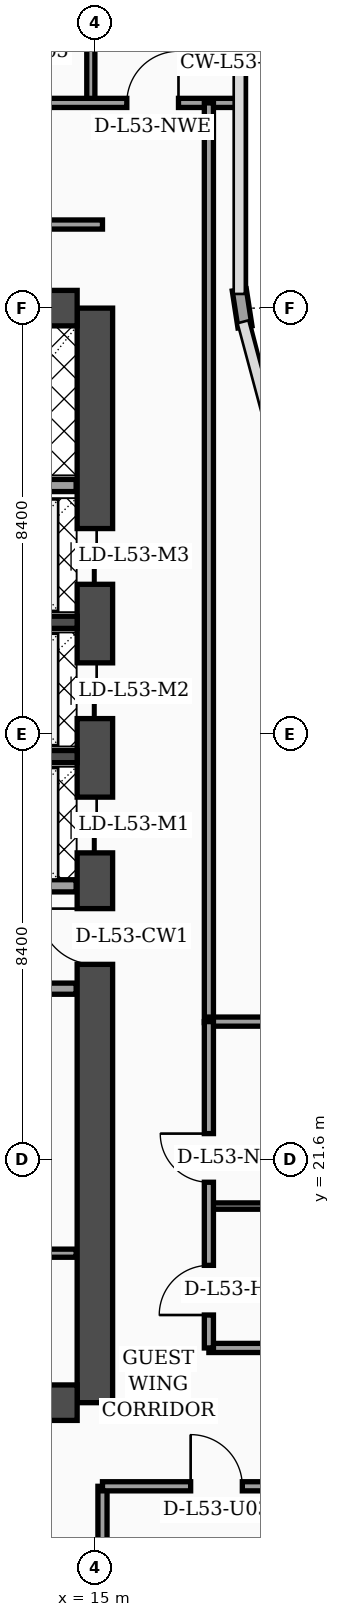
"""IFC4 building model, lengths in metres.
Left out: names, types, materials, properties, quantities, classifications, styles, units other than length and angle.
Written with IfcOpenShell. Run it as: python <this file> out.ifc"""

import sys

from ifc_helpers import new_model, si_unit, direction, frame, frame_2d, origin, place, context, subcontext, project, spatial, rectangle, extrude, element, fill, save


model = new_model("IFC4")
c1 = context("Model", 3, precision=1e-05, world=origin(), true_north=direction((0.0, 1.0)))
c2 = subcontext(c1, "Body", "Model", "MODEL_VIEW")
j1 = project(units=[si_unit("LENGTHUNIT", "METRE"), si_unit("PLANEANGLEUNIT", "RADIAN")], contexts=[c1])
p1 = place(None, origin())
s1 = spatial("IfcSite", under=j1, at=p1, CompositionType="ELEMENT")
p2 = place(p1, origin())
s2 = spatial("IfcBuilding", under=s1, at=p2, CompositionType="ELEMENT")
p3 = place(p2, frame((0.0, 0.0, 214.8)))
s3 = spatial("IfcBuildingStorey", under=s2, at=p3, CompositionType="ELEMENT", Elevation=214.8)
p4 = place(p3, frame((15.0, 16.8, 0.0), z_axis=(0.0, 0.0, 1.0), x_axis=(0.0, 1.0, 0.0)))
e1 = element("IfcWall", 1, at=p4, inside=s3, PredefinedType="SHEAR", context=c2, shape_type="SweptSolid", body=[
    extrude(rectangle(XDim=21.6, YDim=0.7, at=frame_2d((10.8, 0.0))), origin(), (0.0, 0.0, 1.0), 4.05),
])
p5 = place(p4, frame((8.65, 0.0, 0.0)))
e2 = element("IfcOpeningElement", 2, at=p5, cuts=e1, PredefinedType="OPENING", context=c2, shape_type="SweptSolid", body=[
    extrude(rectangle(XDim=1.1, YDim=2.2, at=frame_2d((0.55, 1.1))), frame((0.0, 0.36, 0.0), z_axis=(0.0, -1.0, 0.0), x_axis=(1.0, 0.0, 0.0)), (0.0, 0.0, 1.0), 0.72),
])
p6 = place(p4, frame((10.85, 0.0, 0.0)))
e3 = element("IfcOpeningElement", 3, at=p6, cuts=e1, PredefinedType="OPENING", context=c2, shape_type="SweptSolid", body=[
    extrude(rectangle(XDim=1.1, YDim=2.2, at=frame_2d((0.55, 1.1))), frame((0.0, 0.36, 0.0), z_axis=(0.0, -1.0, 0.0), x_axis=(1.0, 0.0, 0.0)), (0.0, 0.0, 1.0), 0.72),
])
p7 = place(p4, frame((13.5, 0.0, 0.0)))
e4 = element("IfcOpeningElement", 4, at=p7, cuts=e1, PredefinedType="OPENING", context=c2, shape_type="SweptSolid", body=[
    extrude(rectangle(XDim=1.1, YDim=2.2, at=frame_2d((0.55, 1.1))), frame((0.0, 0.36, 0.0), z_axis=(0.0, -1.0, 0.0), x_axis=(1.0, 0.0, 0.0)), (0.0, 0.0, 1.0), 0.72),
])
p8 = place(p4, frame((16.15, 0.0, 0.0)))
e5 = element("IfcOpeningElement", 5, at=p8, cuts=e1, PredefinedType="OPENING", context=c2, shape_type="SweptSolid", body=[
    extrude(rectangle(XDim=1.1, YDim=2.2, at=frame_2d((0.55, 1.1))), frame((0.0, 0.36, 0.0), z_axis=(0.0, -1.0, 0.0), x_axis=(1.0, 0.0, 0.0)), (0.0, 0.0, 1.0), 0.72),
])
for number, where, z_axis, x_axis in (
    (6, (4.55, 38.4, 0.0), (0.0, 0.0, 1.0), (1.0, 0.0, 0.0)),
    (7, (4.55, 16.8, 0.0), (0.0, 0.0, 1.0), (1.0, 0.0, 0.0)),
):
    element("IfcWall", number, at=place(p3, frame(where, z_axis=z_axis, x_axis=x_axis)), inside=s3, PredefinedType="SHEAR", context=c2, shape_type="SweptSolid", body=[
        extrude(rectangle(XDim=10.1, YDim=0.7, at=frame_2d((5.05, 0.0))), origin(), (0.0, 0.0, 1.0), 4.05),
    ])
for number, where, z_axis, x_axis in (
    (8, (12.18, 29.55, 0.0), (0.0, 0.0, 1.0), (1.0, 0.0, 0.0)),
    (9, (12.18, 32.2, 0.0), (0.0, 0.0, 1.0), (1.0, 0.0, 0.0)),
):
    element("IfcWall", number, at=place(p3, frame(where, z_axis=z_axis, x_axis=x_axis)), inside=s3, PredefinedType="SOLIDWALL", context=c2, shape_type="SweptSolid", body=[
        extrude(rectangle(XDim=2.47, YDim=0.24, at=frame_2d((1.235, 0.0))), origin(), (0.0, 0.0, 1.0), 4.05),
    ])
p9 = place(p3, frame((17.962, 38.03, 0.0), z_axis=(0.0, 0.0, 1.0), x_axis=(-0.15141125477, 0.988470855377, 0.0)))
e10 = element("IfcWall", 10, at=p9, inside=s3, PredefinedType="SOLIDWALL", context=c2, shape_type="SweptSolid", body=[
    extrude(rectangle(XDim=0.739, YDim=0.28, at=frame_2d((0.369, 0.0))), origin(), (0.0, 0.0, 1.0), 4.05),
])
p10 = place(p3, frame((9.68, 19.75, 0.0), z_axis=(0.0, 0.0, 1.0), x_axis=(1.0, 0.0, 0.0)))
e11 = element("IfcWall", 11, at=p10, inside=s3, PredefinedType="PARTITIONING", context=c2, shape_type="SweptSolid", body=[
    extrude(rectangle(XDim=4.95, YDim=0.16, at=frame_2d((2.475, 0.0))), origin(), (0.0, 0.0, 1.0), 4.05),
])
p11 = place(p10, frame((1.1, 0.0, 0.0)))
e12 = element("IfcOpeningElement", 12, at=p11, cuts=e11, PredefinedType="OPENING", context=c2, shape_type="SweptSolid", body=[
    extrude(rectangle(XDim=0.98, YDim=2.15, at=frame_2d((0.49, 1.075))), frame((0.0, 0.09, 0.0), z_axis=(0.0, -1.0, 0.0), x_axis=(1.0, 0.0, 0.0)), (0.0, 0.0, 1.0), 0.18),
])
p12 = place(p3, frame((9.68, 24.97, 0.0), z_axis=(0.0, 0.0, 1.0), x_axis=(1.0, 0.0, 0.0)))
e13 = element("IfcWall", 13, at=p12, inside=s3, PredefinedType="SOLIDWALL", context=c2, shape_type="SweptSolid", body=[
    extrude(rectangle(XDim=4.95, YDim=0.22, at=frame_2d((2.475, 0.0))), origin(), (0.0, 0.0, 1.0), 3.45),
])
p13 = place(p12, frame((0.9, 0.0, 0.0)))
e14 = element("IfcOpeningElement", 14, at=p13, cuts=e13, PredefinedType="OPENING", context=c2, shape_type="SweptSolid", body=[
    extrude(rectangle(XDim=0.98, YDim=2.15, at=frame_2d((0.49, 1.075))), frame((0.0, 0.12, 0.0), z_axis=(0.0, -1.0, 0.0), x_axis=(1.0, 0.0, 0.0)), (0.0, 0.0, 1.0), 0.24),
])
p14 = place(p3, frame((12.25, 27.0, 0.0), z_axis=(0.0, 0.0, 1.0), x_axis=(1.0, 0.0, 0.0)))
e15 = element("IfcWall", 15, at=p14, inside=s3, PredefinedType="SOLIDWALL", context=c2, shape_type="SweptSolid", body=[
    extrude(rectangle(XDim=2.38, YDim=0.24, at=frame_2d((1.19, 0.0))), origin(), (0.0, 0.0, 1.0), 4.05),
])
p15 = place(p3, frame((9.66, 34.9, 0.0), z_axis=(0.0, 0.0, 1.0), x_axis=(1.0, 0.0, 0.0)))
e16 = element("IfcWall", 16, at=p15, inside=s3, PredefinedType="SOLIDWALL", context=c2, shape_type="SweptSolid", body=[
    extrude(rectangle(XDim=4.97, YDim=0.24, at=frame_2d((2.485, 0.0))), origin(), (0.0, 0.0, 1.0), 4.05),
])
p16 = place(p3, frame((15.15, 2.44, 0.0), z_axis=(0.0, 0.0, 1.0), x_axis=(0.0, 1.0, 0.0)))
e17 = element("IfcWall", 17, at=p16, inside=s3, PredefinedType="PARTITIONING", context=c2, shape_type="SweptSolid", body=[
    extrude(rectangle(XDim=12.71, YDim=0.18, at=frame_2d((6.355, 0.0))), origin(), (0.0, 0.0, 1.0), 2.35),
])
p17 = place(p3, frame((15.15, 15.15, 0.0), z_axis=(0.0, 0.0, 1.0), x_axis=(1.0, 0.0, 0.0)))
e18 = element("IfcWall", 18, at=p17, inside=s3, PredefinedType="PARTITIONING", context=c2, shape_type="SweptSolid", body=[
    extrude(rectangle(XDim=6.45, YDim=0.18, at=frame_2d((3.225, 0.0))), origin(), (0.0, 0.0, 1.0), 2.35),
])
p18 = place(p17, frame((1.74, 0.0, 0.0)))
e19 = element("IfcOpeningElement", 19, at=p18, cuts=e18, PredefinedType="OPENING", context=c2, shape_type="SweptSolid", body=[
    extrude(rectangle(XDim=1.02, YDim=2.2, at=frame_2d((0.51, 1.1))), frame((0.0, 0.1, 0.0), z_axis=(0.0, -1.0, 0.0), x_axis=(1.0, 0.0, 0.0)), (0.0, 0.0, 1.0), 0.2),
])
p19 = place(p3, frame((14.92, 42.45, 0.0), z_axis=(0.0, 0.0, 1.0), x_axis=(0.0, 1.0, 0.0)))
e20 = element("IfcWall", 20, at=p19, inside=s3, PredefinedType="PARTITIONING", context=c2, shape_type="SweptSolid", body=[
    extrude(rectangle(XDim=5.35, YDim=0.16, at=frame_2d((2.675, 0.0))), origin(), (0.0, 0.0, 1.0), 3.6),
])
p20 = place(p3, frame((0.08, 42.45, 0.0), z_axis=(0.0, 0.0, 1.0), x_axis=(1.0, 0.0, 0.0)))
e21 = element("IfcWall", 21, at=p20, inside=s3, PredefinedType="PARTITIONING", context=c2, shape_type="SweptSolid", body=[
    extrude(rectangle(XDim=17.77, YDim=0.18, at=frame_2d((8.885, 0.0))), origin(), (0.0, 0.0, 1.0), 3.45),
])
p21 = place(p20, frame((0.9, 0.0, 0.0)))
e22 = element("IfcOpeningElement", 22, at=p21, cuts=e21, PredefinedType="OPENING", context=c2, shape_type="SweptSolid", body=[
    extrude(rectangle(XDim=1.02, YDim=2.2, at=frame_2d((0.51, 1.1))), frame((0.0, 0.1, 0.0), z_axis=(0.0, -1.0, 0.0), x_axis=(1.0, 0.0, 0.0)), (0.0, 0.0, 1.0), 0.2),
])
p22 = place(p20, frame((4.9, 0.0, 0.0)))
e23 = element("IfcOpeningElement", 23, at=p22, cuts=e21, PredefinedType="OPENING", context=c2, shape_type="SweptSolid", body=[
    extrude(rectangle(XDim=1.02, YDim=2.2, at=frame_2d((0.51, 1.1))), frame((0.0, 0.1, 0.0), z_axis=(0.0, -1.0, 0.0), x_axis=(1.0, 0.0, 0.0)), (0.0, 0.0, 1.0), 0.2),
])
p23 = place(p20, frame((10.78, 0.0, 0.0)))
e24 = element("IfcOpeningElement", 24, at=p23, cuts=e21, PredefinedType="OPENING", context=c2, shape_type="SweptSolid", body=[
    extrude(rectangle(XDim=1.02, YDim=2.2, at=frame_2d((0.51, 1.1))), frame((0.0, 0.1, 0.0), z_axis=(0.0, -1.0, 0.0), x_axis=(1.0, 0.0, 0.0)), (0.0, 0.0, 1.0), 0.2),
])
p24 = place(p20, frame((15.55, 0.0, 0.0)))
e25 = element("IfcOpeningElement", 25, at=p24, cuts=e21, PredefinedType="OPENING", context=c2, shape_type="SweptSolid", body=[
    extrude(rectangle(XDim=1.02, YDim=2.2, at=frame_2d((0.51, 1.1))), frame((0.0, 0.1, 0.0), z_axis=(0.0, -1.0, 0.0), x_axis=(1.0, 0.0, 0.0)), (0.0, 0.0, 1.0), 0.2),
])
p25 = place(p3, frame((17.25, 24.3, 0.0), z_axis=(0.0, 0.0, 1.0), x_axis=(0.0, 1.0, 0.0)))
e26 = element("IfcWall", 26, at=p25, inside=s3, PredefinedType="PARTITIONING", context=c2, shape_type="SweptSolid", body=[
    extrude(rectangle(XDim=18.15, YDim=0.18, at=frame_2d((9.075, 0.0))), origin(), (0.0, 0.0, 1.0), 3.45),
])
p26 = place(p3, frame((3.83, 40.05, 0.0), z_axis=(0.0, 0.0, 1.0), x_axis=(1.0, 0.0, 0.0)))
e27 = element("IfcWall", 27, at=p26, inside=s3, PredefinedType="PARTITIONING", context=c2, shape_type="SweptSolid", body=[
    extrude(rectangle(XDim=11.32, YDim=0.18, at=frame_2d((5.66, 0.0))), origin(), (0.0, 0.0, 1.0), 3.45),
])
p27 = place(p3, frame((17.25, 17.88, 0.0), z_axis=(0.0, 0.0, 1.0), x_axis=(1.0, 0.0, 0.0)))
e28 = element("IfcWall", 28, at=p27, inside=s3, PredefinedType="PARTITIONING", context=c2, shape_type="SweptSolid", body=[
    extrude(rectangle(XDim=4.3, YDim=0.18, at=frame_2d((2.15, 0.0))), origin(), (0.0, 0.0, 1.0), 4.05),
])
p28 = place(p3, frame((17.25, 20.68, 0.0), z_axis=(0.0, 0.0, 1.0), x_axis=(1.0, 0.0, 0.0)))
e29 = element("IfcWall", 29, at=p28, inside=s3, PredefinedType="PARTITIONING", context=c2, shape_type="SweptSolid", body=[
    extrude(rectangle(XDim=4.3, YDim=0.125, at=frame_2d((2.15, 0.0))), origin(), (0.0, 0.0, 1.0), 4.05),
])
p29 = place(p3, frame((17.25, 24.32, 0.0), z_axis=(0.0, 0.0, 1.0), x_axis=(1.0, 0.0, 0.0)))
e30 = element("IfcWall", 30, at=p29, inside=s3, PredefinedType="PARTITIONING", context=c2, shape_type="SweptSolid", body=[
    extrude(rectangle(XDim=4.35, YDim=0.18, at=frame_2d((2.175, 0.0))), origin(), (0.0, 0.0, 1.0), 4.05),
])
p30 = place(p3, frame((17.25, 17.88, 0.0), z_axis=(0.0, 0.0, 1.0), x_axis=(0.0, 1.0, 0.0)))
e31 = element("IfcWall", 31, at=p30, inside=s3, PredefinedType="PARTITIONING", context=c2, shape_type="SweptSolid", body=[
    extrude(rectangle(XDim=6.44, YDim=0.18, at=frame_2d((3.22, 0.0))), origin(), (0.0, 0.0, 1.0), 4.05),
])
p31 = place(p30, frame((0.65, 0.0, 0.0)))
e32 = element("IfcOpeningElement", 32, at=p31, cuts=e31, PredefinedType="OPENING", context=c2, shape_type="SweptSolid", body=[
    extrude(rectangle(XDim=0.98, YDim=2.15, at=frame_2d((0.49, 1.075))), frame((0.0, 0.1, 0.0), z_axis=(0.0, -1.0, 0.0), x_axis=(1.0, 0.0, 0.0)), (0.0, 0.0, 1.0), 0.2),
])
p32 = place(p30, frame((3.27, 0.0, 0.0)))
e33 = element("IfcOpeningElement", 33, at=p32, cuts=e31, PredefinedType="OPENING", context=c2, shape_type="SweptSolid", body=[
    extrude(rectangle(XDim=0.96, YDim=2.2, at=frame_2d((0.48, 1.1))), frame((0.0, 0.1, 0.0), z_axis=(0.0, -1.0, 0.0), x_axis=(1.0, 0.0, 0.0)), (0.0, 0.0, 1.0), 0.2),
])
p33 = place(p18, origin())
e34 = element("IfcDoor", 34, at=p33, inside=s3, OperationType="SINGLE_SWING_LEFT", PredefinedType="DOOR", context=c2, shape_type="SweptSolid", body=[
    extrude(rectangle(XDim=1.02, YDim=2.2, at=frame_2d((0.51, 1.1))), frame((0.0, 0.025, 0.0), z_axis=(0.0, -1.0, 0.0), x_axis=(1.0, 0.0, 0.0)), (0.0, 0.0, 1.0), 0.05),
])
fill(e19, e34)
p34 = place(p24, origin())
e35 = element("IfcDoor", 35, at=p34, inside=s3, OperationType="SINGLE_SWING_RIGHT", PredefinedType="DOOR", context=c2, shape_type="SweptSolid", body=[
    extrude(rectangle(XDim=1.02, YDim=2.2, at=frame_2d((0.51, 1.1))), frame((0.0, 0.025, 0.0), z_axis=(0.0, -1.0, 0.0), x_axis=(1.0, 0.0, 0.0)), (0.0, 0.0, 1.0), 0.05),
])
fill(e25, e35)
p35 = place(p31, origin())
e36 = element("IfcDoor", 36, at=p35, inside=s3, OperationType="SINGLE_SWING_LEFT", PredefinedType="DOOR", context=c2, shape_type="SweptSolid", body=[
    extrude(rectangle(XDim=0.98, YDim=2.15, at=frame_2d((0.49, 1.075))), frame((0.0, 0.025, 0.0), z_axis=(0.0, -1.0, 0.0), x_axis=(1.0, 0.0, 0.0)), (0.0, 0.0, 1.0), 0.05),
])
fill(e32, e36)
p36 = place(p32, origin())
e37 = element("IfcDoor", 37, at=p36, inside=s3, OperationType="SINGLE_SWING_RIGHT", PredefinedType="DOOR", context=c2, shape_type="SweptSolid", body=[
    extrude(rectangle(XDim=0.96, YDim=2.2, at=frame_2d((0.48, 1.1))), frame((0.0, 0.025, 0.0), z_axis=(0.0, -1.0, 0.0), x_axis=(1.0, 0.0, 0.0)), (0.0, 0.0, 1.0), 0.05),
])
fill(e33, e37)
p37 = place(p5, origin())
e38 = element("IfcDoor", 38, at=p37, inside=s3, OperationType="SINGLE_SWING_RIGHT", PredefinedType="DOOR", context=c2, shape_type="SweptSolid", body=[
    extrude(rectangle(XDim=1.1, YDim=2.2, at=frame_2d((0.55, 1.1))), frame((0.0, 0.025, 0.0), z_axis=(0.0, -1.0, 0.0), x_axis=(1.0, 0.0, 0.0)), (0.0, 0.0, 1.0), 0.05),
])
fill(e2, e38)
p38 = place(p6, origin())
e39 = element("IfcDoor", 39, at=p38, inside=s3, OperationType="DOUBLE_DOOR_SLIDING", PredefinedType="DOOR", context=c2, shape_type="SweptSolid", body=[
    extrude(rectangle(XDim=1.1, YDim=2.2, at=frame_2d((0.55, 1.1))), frame((0.0, 0.025, 0.0), z_axis=(0.0, -1.0, 0.0), x_axis=(1.0, 0.0, 0.0)), (0.0, 0.0, 1.0), 0.05),
])
fill(e3, e39)
p39 = place(p7, origin())
e40 = element("IfcDoor", 40, at=p39, inside=s3, OperationType="DOUBLE_DOOR_SLIDING", PredefinedType="DOOR", context=c2, shape_type="SweptSolid", body=[
    extrude(rectangle(XDim=1.1, YDim=2.2, at=frame_2d((0.55, 1.1))), frame((0.0, 0.025, 0.0), z_axis=(0.0, -1.0, 0.0), x_axis=(1.0, 0.0, 0.0)), (0.0, 0.0, 1.0), 0.05),
])
fill(e4, e40)
p40 = place(p8, origin())
e41 = element("IfcDoor", 41, at=p40, inside=s3, OperationType="DOUBLE_DOOR_SLIDING", PredefinedType="DOOR", context=c2, shape_type="SweptSolid", body=[
    extrude(rectangle(XDim=1.1, YDim=2.2, at=frame_2d((0.55, 1.1))), frame((0.0, 0.025, 0.0), z_axis=(0.0, -1.0, 0.0), x_axis=(1.0, 0.0, 0.0)), (0.0, 0.0, 1.0), 0.05),
])
fill(e5, e41)
save(model, sys.argv[1])
